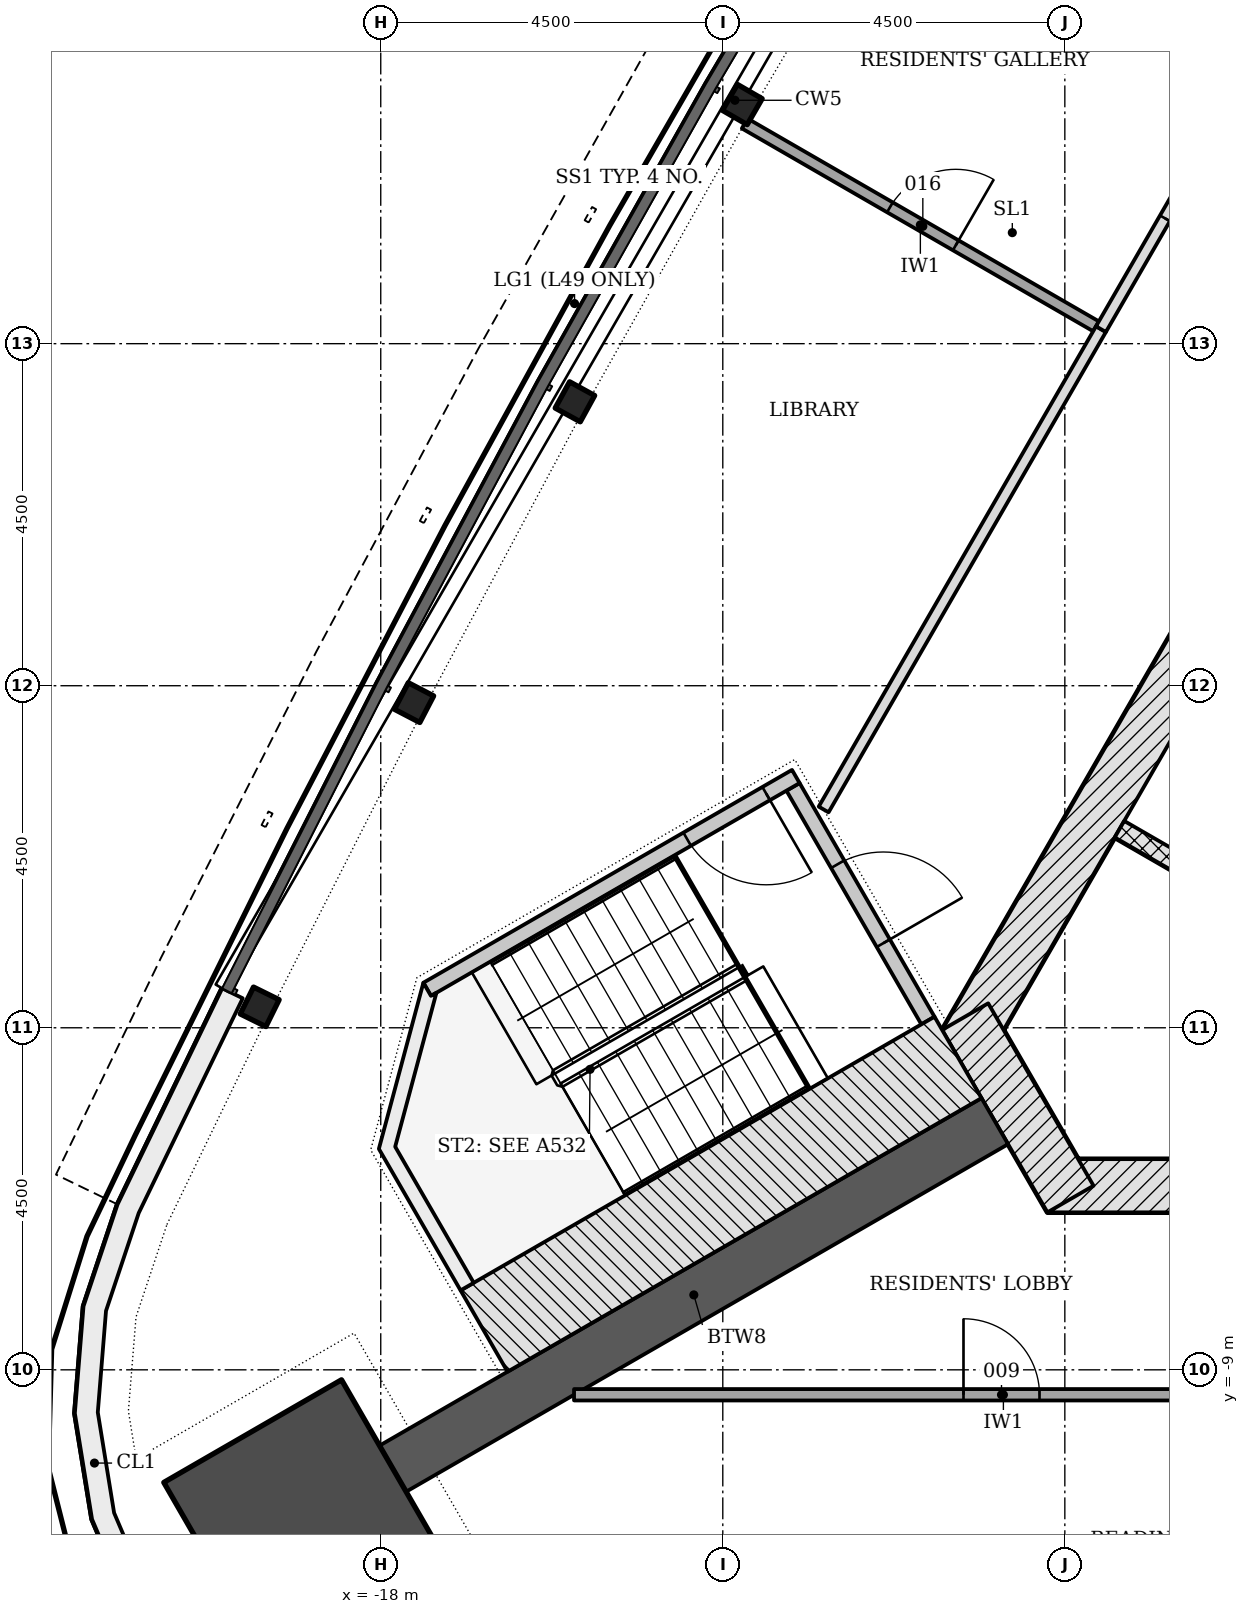
"""IFC4 building model, lengths in metres.
Left out: names, types, materials, properties, quantities, classifications, styles, units other than length and angle.
Written with IfcOpenShell. Run it as: python <this file> out.ifc"""

import sys

from ifc_helpers import new_model, si_unit, direction, frame, frame_2d, origin, origin_2d, place, context, subcontext, project, spatial, polyline, rectangle, i_section, outline, extrude, element, fill, save


model = new_model("IFC4")
c1 = context("Model", 3, precision=1e-05, world=origin(), true_north=direction((0.0, 1.0)))
c2 = subcontext(c1, "Body", "Model", "MODEL_VIEW")
j1 = project(units=[si_unit("LENGTHUNIT", "METRE"), si_unit("PLANEANGLEUNIT", "RADIAN")], contexts=[c1])
p1 = place(None, origin())
s1 = spatial("IfcSite", under=j1, at=p1, CompositionType="ELEMENT")
p2 = place(p1, origin())
s2 = spatial("IfcBuilding", under=s1, at=p2, CompositionType="ELEMENT")
p3 = place(p2, frame((0.0, 0.0, 192.3)))
s3 = spatial("IfcBuildingStorey", under=s2, at=p3, CompositionType="ELEMENT", Elevation=192.3)
p4 = place(p3, frame((-9.229, -6.578, -0.2), z_axis=(0.0, 0.0, 1.0), x_axis=(1.0, 0.0, 0.0)))
e1 = element("IfcWall", 1, at=p4, inside=s3, PredefinedType="SHEAR", context=c2, shape_type="SweptSolid", body=[
    extrude(rectangle(XDim=18.458, YDim=0.7, at=frame_2d((9.229, 0.0))), origin(), (0.0, 0.0, 1.0), 3.6),
])
p5 = place(p4, frame((6.1, 0.0, 0.2)))
e2 = element("IfcOpeningElement", 2, at=p5, cuts=e1, PredefinedType="OPENING", context=c2, shape_type="SweptSolid", body=[
    extrude(rectangle(XDim=1.0, YDim=2.1, at=frame_2d((0.5, 1.05))), frame((0.0, 0.36, 0.0), z_axis=(0.0, -1.0, 0.0), x_axis=(1.0, 0.0, 0.0)), (0.0, 0.0, 1.0), 0.72),
])
p6 = place(p4, frame((2.615, 0.0, 0.2)))
e3 = element("IfcOpeningElement", 3, at=p6, cuts=e1, PredefinedType="OPENING", context=c2, shape_type="SweptSolid", body=[
    extrude(rectangle(XDim=1.0, YDim=2.1, at=frame_2d((0.5, 1.05))), frame((0.0, 0.36, 0.0), z_axis=(0.0, -1.0, 0.0), x_axis=(1.0, 0.0, 0.0)), (0.0, 0.0, 1.0), 0.72),
])
p7 = place(p4, frame((9.198, 0.0, 0.2)))
e4 = element("IfcOpeningElement", 4, at=p7, cuts=e1, PredefinedType="OPENING", context=c2, shape_type="SweptSolid", body=[
    extrude(rectangle(XDim=0.9, YDim=2.1, at=frame_2d((0.45, 1.05))), frame((0.0, 0.36, 0.0), z_axis=(0.0, -1.0, 0.0), x_axis=(1.0, 0.0, 0.0)), (0.0, 0.0, 1.0), 0.72),
])
p8 = place(p4, frame((13.877, 0.0, 0.2)))
e5 = element("IfcOpeningElement", 5, at=p8, cuts=e1, PredefinedType="OPENING", context=c2, shape_type="SweptSolid", body=[
    extrude(rectangle(XDim=0.9, YDim=2.1, at=frame_2d((0.45, 1.05))), frame((0.0, 0.36, 0.0), z_axis=(0.0, -1.0, 0.0), x_axis=(1.0, 0.0, 0.0)), (0.0, 0.0, 1.0), 0.72),
])
p9 = place(p3, frame((-1.083, 11.281, -0.2), z_axis=(0.0, 0.0, 1.0), x_axis=(-0.500001446645, -0.866024568562, 0.0)))
e6 = element("IfcWall", 6, at=p9, inside=s3, PredefinedType="SHEAR", context=c2, shape_type="SweptSolid", body=[
    extrude(rectangle(XDim=18.458, YDim=0.7, at=frame_2d((9.229, 0.0))), origin(), (0.0, 0.0, 1.0), 3.6),
])
p10 = place(p9, frame((8.979, 0.0, 0.2)))
e7 = element("IfcOpeningElement", 7, at=p10, cuts=e6, PredefinedType="OPENING", context=c2, shape_type="SweptSolid", body=[
    extrude(rectangle(XDim=1.2, YDim=2.1, at=frame_2d((0.6, 1.05))), frame((0.0, 0.36, 0.0), z_axis=(0.0, -1.0, 0.0), x_axis=(1.0, 0.0, 0.0)), (0.0, 0.0, 1.0), 0.72),
])
p11 = place(p9, frame((11.029, 0.0, 0.2)))
e8 = element("IfcOpeningElement", 8, at=p11, cuts=e6, PredefinedType="OPENING", context=c2, shape_type="SweptSolid", body=[
    extrude(rectangle(XDim=1.2, YDim=2.1, at=frame_2d((0.6, 1.05))), frame((0.0, 0.36, 0.0), z_axis=(0.0, -1.0, 0.0), x_axis=(1.0, 0.0, 0.0)), (0.0, 0.0, 1.0), 0.72),
])
p12 = place(p3, frame((-10.311, -4.353, -0.2), z_axis=(0.0, 0.0, 1.0), x_axis=(0.500042739161, -0.866000726912, 0.0)))
e9 = element("IfcWall", 9, at=p12, inside=s3, PredefinedType="SHEAR", context=c2, shape_type="SweptSolid", body=[
    extrude(rectangle(XDim=2.771, YDim=0.7, at=frame_2d((1.386, 0.0))), origin(), (0.0, 0.0, 1.0), 3.6),
])
p13 = place(p3, frame((-9.922, -5.728, -0.2), z_axis=(0.0, 0.0, 1.0), x_axis=(-0.866026421479, -0.499998237297, 0.0)))
e10 = element("IfcWall", 10, at=p13, inside=s3, PredefinedType="SHEAR", context=c2, shape_type="SweptSolid", body=[
    extrude(rectangle(XDim=9.145, YDim=0.7, at=frame_2d((4.572, 0.0))), origin(), (0.0, 0.0, 1.0), 3.6),
])
p14 = place(p3, frame((-19.01, -10.976, -0.2), z_axis=(0.0, 0.0, 1.0), x_axis=(-0.866025403784, -0.5, 0.0)))
e11 = element("IfcColumn", 11, at=p14, inside=s3, PredefinedType="COLUMN", context=c2, shape_type="SweptSolid", body=[
    extrude(rectangle(XDim=2.7, YDim=2.7, at=origin_2d()), origin(), (0.0, 0.0, 1.0), 3.6),
])
for number, where, z_axis, x_axis in (
    (12, (-13.243, 7.646, -0.2), (0.0, 0.0, 1.0), (-0.5, -0.866, 0.0)),
    (13, (-15.445, 3.735, -0.2), (0.0, 0.0, 1.0), (-0.481, -0.877, 0.0)),
    (14, (-17.562, -0.222, -0.2), (0.0, 0.0, 1.0), (-0.462, -0.887, 0.0)),
    (15, (-19.593, -4.225, -0.2), (0.0, 0.0, 1.0), (-0.443, -0.897, 0.0)),
):
    element("IfcColumn", number, at=place(p3, frame(where, z_axis=z_axis, x_axis=x_axis)), inside=s3, PredefinedType="COLUMN", context=c2, shape_type="SweptSolid", body=[
        extrude(i_section(OverallWidth=0.394, OverallDepth=0.376, WebThickness=0.017, FlangeThickness=0.028, FilletRadius=0.015, at=origin_2d()), origin(), (0.0, 0.0, 1.0), 3.6),
    ])
p15 = place(p3, origin())
e16 = element("IfcWall", 16, at=p15, inside=s3, PredefinedType="NOTDEFINED", context=c2, shape_type="SweptSolid", body=[
    extrude(outline(polyline([(-20.086, -3.981), (-21.463, -6.824), (-21.91, -8.164), (-22.025, -9.572), (-21.798, -10.966), (-21.245, -12.266), (-20.396, -13.395), (-19.302, -14.288), (-18.025, -14.893), (-16.641, -15.175), (-13.49, -15.404), (-13.469, -15.105), (-16.6, -14.877), (-17.929, -14.606), (-19.14, -14.032), (-20.178, -13.186), (-20.983, -12.115), (-21.508, -10.882), (-21.723, -9.56), (-21.615, -8.224), (-21.184, -6.937), (-19.816, -4.112), (-20.086, -3.981)])), origin(), (0.0, 0.0, 1.0), 3.3),
])
p16 = place(p3, frame((-8.281, -1.887, -0.2), z_axis=(0.0, 0.0, 1.0), x_axis=(0.866032775405, -0.499987231761, 0.0)))
e17 = element("IfcWall", 17, at=p16, inside=s3, PredefinedType="PARTITIONING", context=c2, shape_type="SweptSolid", body=[
    extrude(rectangle(XDim=2.9, YDim=0.25, at=frame_2d((1.45, 0.0))), origin(), (0.0, 0.0, 1.0), 3.6),
])
p17 = place(p3, frame((-12.576, -1.331, -0.2), z_axis=(0.0, 0.0, 1.0), x_axis=(0.499970499736, -0.8660424351, 0.0)))
e18 = element("IfcWall", 18, at=p17, inside=s3, PredefinedType="SHEAR", context=c2, shape_type="SweptSolid", body=[
    extrude(rectangle(XDim=3.55, YDim=0.2, at=frame_2d((1.775, 0.0))), origin(), (0.0, 0.0, 1.0), 3.6),
])
p18 = place(p17, frame((1.175, 0.0, 0.2)))
e19 = element("IfcOpeningElement", 19, at=p18, cuts=e18, PredefinedType="OPENING", context=c2, shape_type="SweptSolid", body=[
    extrude(rectangle(XDim=1.2, YDim=2.1, at=frame_2d((0.6, 1.05))), frame((0.0, 0.11, 0.0), z_axis=(0.0, -1.0, 0.0), x_axis=(1.0, 0.0, 0.0)), (0.0, 0.0, 1.0), 0.22),
])
p19 = place(p3, frame((-12.539, -1.194, -0.2), z_axis=(0.0, 0.0, 1.0), x_axis=(-0.866045472092, -0.499965239061, 0.0)))
e20 = element("IfcWall", 20, at=p19, inside=s3, PredefinedType="SHEAR", context=c2, shape_type="SweptSolid", body=[
    extrude(rectangle(XDim=5.6, YDim=0.2, at=frame_2d((2.8, 0.0))), origin(), (0.0, 0.0, 1.0), 3.6),
])
p20 = place(p19, frame((0.45, 0.0, 0.2)))
e21 = element("IfcOpeningElement", 21, at=p20, cuts=e20, PredefinedType="OPENING", context=c2, shape_type="SweptSolid", body=[
    extrude(rectangle(XDim=1.2, YDim=2.1, at=frame_2d((0.6, 1.05))), frame((0.0, 0.11, 0.0), z_axis=(0.0, -1.0, 0.0), x_axis=(1.0, 0.0, 0.0)), (0.0, 0.0, 1.0), 0.22),
])
p21 = place(p3, frame((-10.406, -4.89, -0.2), z_axis=(0.0, 0.0, 1.0), x_axis=(-0.866018442252, -0.500012057535, 0.0)))
e22 = element("IfcWall", 22, at=p21, inside=s3, PredefinedType="SHEAR", context=c2, shape_type="SweptSolid", body=[
    extrude(rectangle(XDim=7.2, YDim=1.236, at=frame_2d((3.6, 0.0))), origin(), (0.0, 0.0, 1.0), 3.6),
])
p22 = place(p3, frame((0.0, 0.0, -0.2)))
e23 = element("IfcWall", 23, at=p22, inside=s3, PredefinedType="SHEAR", context=c2, shape_type="SweptSolid", body=[
    extrude(outline(polyline([(-17.439, -3.907), (-18.025, -6.093), (-16.95, -7.955), (-16.777, -7.855), (-17.81, -6.065), (-17.267, -4.039), (-17.339, -4.081), (-17.339, -4.081), (-17.339, -4.081), (-17.339, -4.081), (-17.339, -4.081), (-17.339, -4.081), (-17.339, -4.081), (-17.339, -4.081), (-17.339, -4.081), (-17.339, -4.081), (-17.339, -4.081), (-17.339, -4.081), (-17.339, -4.081), (-17.339, -4.081), (-17.339, -4.081), (-17.339, -4.081), (-17.339, -4.081), (-17.439, -3.907)])), origin(), (0.0, 0.0, 1.0), 3.6),
])
p23 = place(p3, frame((-15.457, -9.328, 0.0), z_axis=(0.0, 0.0, 1.0), x_axis=(1.0, 0.0, 0.0)))
e24 = element("IfcWall", 24, at=p23, inside=s3, PredefinedType="PARTITIONING", context=c2, shape_type="SweptSolid", body=[
    extrude(rectangle(XDim=11.297, YDim=0.15, at=frame_2d((5.649, 0.0))), origin(), (0.0, 0.0, 1.0), 2.852),
])
p24 = place(p23, frame((5.124, 0.0, 0.0)))
e25 = element("IfcOpeningElement", 25, at=p24, cuts=e24, PredefinedType="OPENING", context=c2, shape_type="SweptSolid", body=[
    extrude(rectangle(XDim=1.0, YDim=2.1, at=frame_2d((0.5, 1.05))), frame((0.0, 0.085, 0.0), z_axis=(0.0, -1.0, 0.0), x_axis=(1.0, 0.0, 0.0)), (0.0, 0.0, 1.0), 0.17),
])
p25 = place(p3, frame((-8.525, 4.691, 0.0), z_axis=(0.0, 0.0, 1.0), x_axis=(-0.499986021771, -0.866033473968, 0.0)))
e26 = element("IfcWall", 26, at=p25, inside=s3, PredefinedType="PARTITIONING", context=c2, shape_type="SweptSolid", body=[
    extrude(rectangle(XDim=7.297, YDim=0.15, at=frame_2d((3.648, 0.0))), origin(), (0.0, 0.0, 1.0), 2.852),
])
p26 = place(p3, frame((-13.212, 7.397, 0.0), z_axis=(0.0, 0.0, 1.0), x_axis=(0.866041606145, -0.499971935638, 0.0)))
e27 = element("IfcWall", 27, at=p26, inside=s3, PredefinedType="PARTITIONING", context=c2, shape_type="SweptSolid", body=[
    extrude(rectangle(XDim=5.337, YDim=0.15, at=frame_2d((2.668, 0.0))), origin(), (0.0, 0.0, 1.0), 3.4),
])
p27 = place(p26, frame((2.206, 0.0, 0.0)))
e28 = element("IfcOpeningElement", 28, at=p27, cuts=e27, PredefinedType="OPENING", context=c2, shape_type="SweptSolid", body=[
    extrude(rectangle(XDim=1.0, YDim=2.1, at=frame_2d((0.5, 1.05))), frame((0.0, 0.085, 0.0), z_axis=(0.0, -1.0, 0.0), x_axis=(1.0, 0.0, 0.0)), (0.0, 0.0, 1.0), 0.17),
])
p28 = place(p3, frame((-6.341, 8.474, 0.0), z_axis=(0.0, 0.0, 1.0), x_axis=(-0.49999822179, -0.866026430432, 0.0)))
e29 = element("IfcWall", 29, at=p28, inside=s3, PredefinedType="PARTITIONING", context=c2, shape_type="SweptSolid", body=[
    extrude(rectangle(XDim=4.368, YDim=0.15, at=frame_2d((2.184, 0.0))), origin(), (0.0, 0.0, 1.0), 2.852),
])
p29 = place(p28, frame((1.684, 0.0, 0.0)))
e30 = element("IfcOpeningElement", 30, at=p29, cuts=e29, PredefinedType="OPENING", context=c2, shape_type="SweptSolid", body=[
    extrude(rectangle(XDim=1.0, YDim=2.1, at=frame_2d((0.5, 1.05))), frame((0.0, 0.085, 0.0), z_axis=(0.0, -1.0, 0.0), x_axis=(1.0, 0.0, 0.0)), (0.0, 0.0, 1.0), 0.17),
])
p30 = place(p18, origin())
e31 = element("IfcDoor", 31, at=p30, inside=s3, OperationType="SINGLE_SWING_RIGHT", PredefinedType="DOOR", context=c2, shape_type="SweptSolid", body=[
    extrude(rectangle(XDim=1.2, YDim=2.1, at=frame_2d((0.6, 1.05))), frame((0.0, 0.025, 0.0), z_axis=(0.0, -1.0, 0.0), x_axis=(1.0, 0.0, 0.0)), (0.0, 0.0, 1.0), 0.05),
])
fill(e19, e31)
p31 = place(p20, origin())
e32 = element("IfcDoor", 32, at=p31, inside=s3, OperationType="SINGLE_SWING_LEFT", PredefinedType="DOOR", context=c2, shape_type="SweptSolid", body=[
    extrude(rectangle(XDim=1.2, YDim=2.1, at=frame_2d((0.6, 1.05))), frame((0.0, 0.025, 0.0), z_axis=(0.0, -1.0, 0.0), x_axis=(1.0, 0.0, 0.0)), (0.0, 0.0, 1.0), 0.05),
])
fill(e21, e32)
p32 = place(p24, origin())
e33 = element("IfcDoor", 33, at=p32, inside=s3, OperationType="SINGLE_SWING_LEFT", PredefinedType="DOOR", context=c2, shape_type="SweptSolid", body=[
    extrude(rectangle(XDim=1.0, YDim=2.1, at=frame_2d((0.5, 1.05))), frame((0.0, 0.025, 0.0), z_axis=(0.0, -1.0, 0.0), x_axis=(1.0, 0.0, 0.0)), (0.0, 0.0, 1.0), 0.05),
])
fill(e25, e33)
p33 = place(p29, origin())
e34 = element("IfcDoor", 34, at=p33, inside=s3, OperationType="SINGLE_SWING_RIGHT", PredefinedType="DOOR", context=c2, shape_type="SweptSolid", body=[
    extrude(rectangle(XDim=1.0, YDim=2.1, at=frame_2d((0.5, 1.05))), frame((0.0, 0.025, 0.0), z_axis=(0.0, -1.0, 0.0), x_axis=(1.0, 0.0, 0.0)), (0.0, 0.0, 1.0), 0.05),
])
fill(e30, e34)
p34 = place(p27, origin())
e35 = element("IfcDoor", 35, at=p34, inside=s3, OperationType="SINGLE_SWING_RIGHT", PredefinedType="DOOR", context=c2, shape_type="SweptSolid", body=[
    extrude(rectangle(XDim=1.0, YDim=2.1, at=frame_2d((0.5, 1.05))), frame((0.0, 0.025, 0.0), z_axis=(0.0, -1.0, 0.0), x_axis=(1.0, 0.0, 0.0)), (0.0, 0.0, 1.0), 0.05),
])
fill(e28, e35)
save(model, sys.argv[1])
